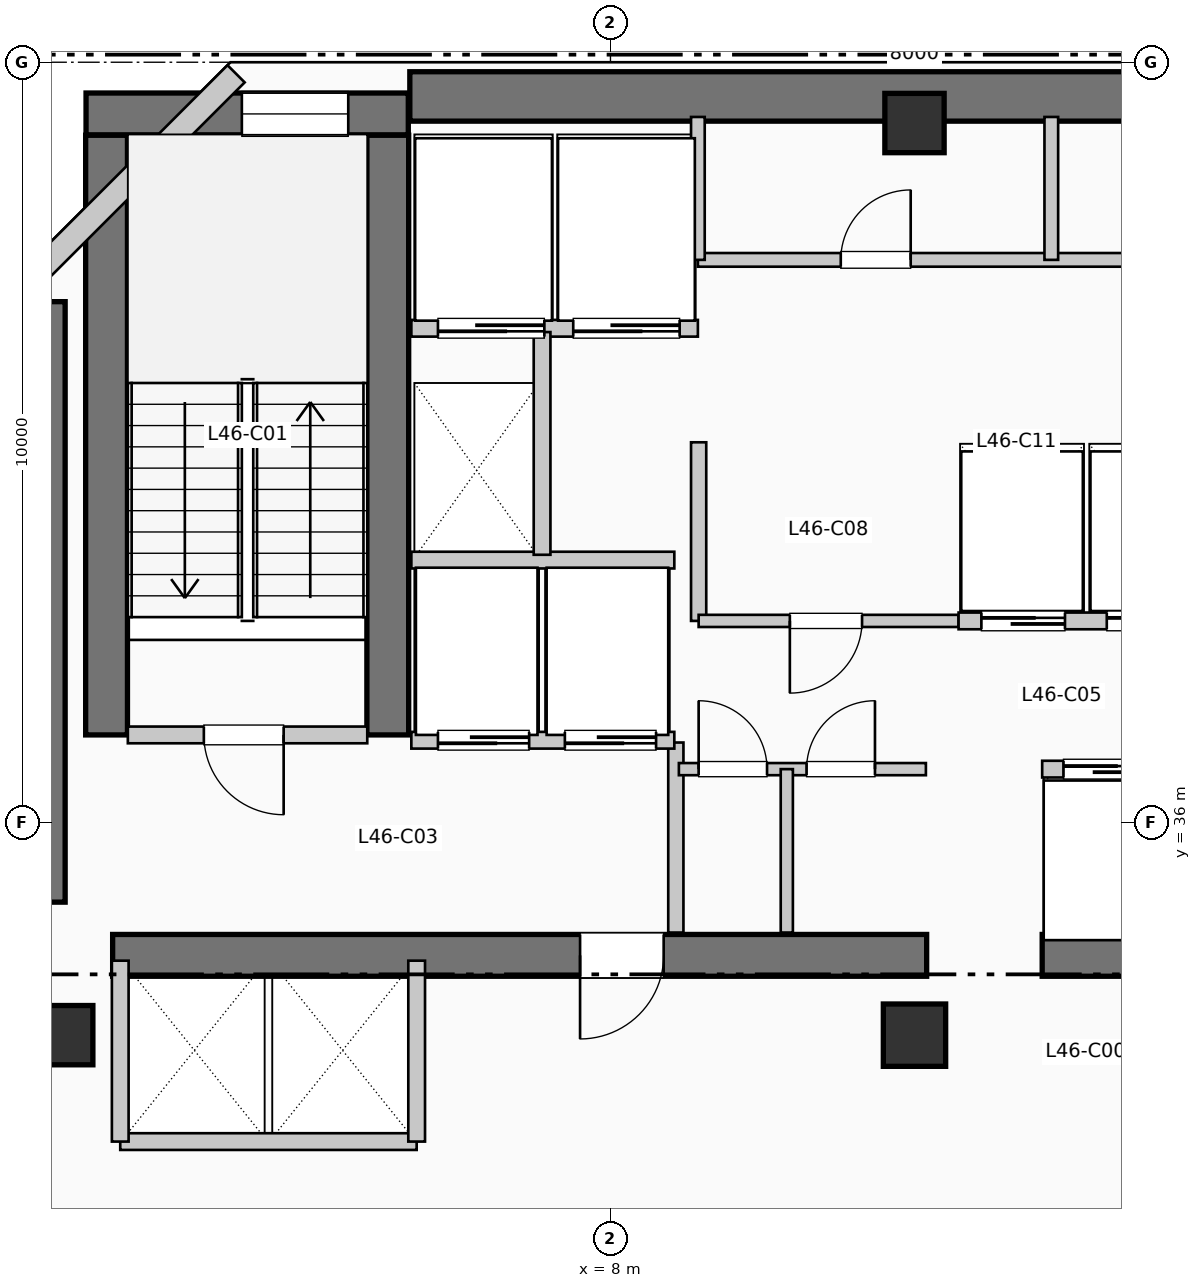
"""IFC4 building model, lengths in metres.
Left out: names, types, materials, properties, quantities, classifications, styles, units other than length and angle.
Written with IfcOpenShell. Run it as: python <this file> out.ifc"""

import sys

from ifc_helpers import new_model, si_unit, direction, frame, frame_2d, origin, origin_2d, place, context, subcontext, project, spatial, rectangle, extrude, element, fill, save


model = new_model("IFC4")
c1 = context("Model", 3, precision=1e-05, world=origin(), true_north=direction((0.0, 1.0)))
c2 = subcontext(c1, "Body", "Model", "MODEL_VIEW")
j1 = project(units=[si_unit("LENGTHUNIT", "METRE"), si_unit("PLANEANGLEUNIT", "RADIAN")], contexts=[c1])
p1 = place(None, origin())
s1 = spatial("IfcSite", under=j1, at=p1, CompositionType="ELEMENT")
p2 = place(p1, origin())
s2 = spatial("IfcBuilding", under=s1, at=p2, CompositionType="ELEMENT")
p3 = place(p2, frame((0.0, 0.0, 191.4)))
s3 = spatial("IfcBuildingStorey", under=s2, at=p3, CompositionType="ELEMENT", Elevation=191.4)
p4 = place(p3, frame((5.36, 45.55, 0.0), z_axis=(0.0, 0.0, 1.0), x_axis=(1.0, 0.0, 0.0)))
e1 = element("IfcWall", 1, at=p4, inside=s3, PredefinedType="SHEAR", context=c2, shape_type="SweptSolid", body=[
    extrude(rectangle(XDim=13.98, YDim=0.65, at=frame_2d((6.99, 0.0))), origin(), (0.0, 0.0, 1.0), 3.96),
])
p5 = place(p3, frame((0.5, 34.95, 0.0), z_axis=(0.0, 0.0, 1.0), x_axis=(0.0, 1.0, 0.0)))
e2 = element("IfcWall", 2, at=p5, inside=s3, PredefinedType="SHEAR", context=c2, shape_type="SweptSolid", body=[
    extrude(rectangle(XDim=7.9, YDim=0.65, at=frame_2d((3.95, 0.0))), origin(), (0.0, 0.0, 1.0), 3.96),
])
p6 = place(p3, frame((1.45, 34.25, 0.0), z_axis=(0.0, 0.0, 1.0), x_axis=(1.0, 0.0, 0.0)))
e3 = element("IfcWall", 3, at=p6, inside=s3, PredefinedType="SHEAR", context=c2, shape_type="SweptSolid", body=[
    extrude(rectangle(XDim=10.71, YDim=0.55, at=frame_2d((5.355, 0.0))), origin(), (0.0, 0.0, 1.0), 3.96),
])
p7 = place(p6, frame((7.25, 0.0, 0.0), z_axis=(0.0, 0.0, 1.0), x_axis=(-1.0, 0.0, 0.0)))
e4 = element("IfcOpeningElement", 4, at=p7, cuts=e3, PredefinedType="OPENING", context=c2, shape_type="SweptSolid", body=[
    extrude(rectangle(XDim=1.1, YDim=2.15, at=frame_2d((0.55, 1.075))), frame((0.0, 0.285, 0.0), z_axis=(0.0, -1.0, 0.0), x_axis=(1.0, 0.0, 0.0)), (0.0, 0.0, 1.0), 0.57),
])
p8 = place(p3, frame((13.68, 34.25, 0.0), z_axis=(0.0, 0.0, 1.0), x_axis=(1.0, 0.0, 0.0)))
e5 = element("IfcWall", 5, at=p8, inside=s3, PredefinedType="SHEAR", context=c2, shape_type="SweptSolid", body=[
    extrude(rectangle(XDim=6.12, YDim=0.55, at=frame_2d((3.06, 0.0))), origin(), (0.0, 0.0, 1.0), 3.96),
])
for number, where, z_axis, x_axis in (
    (6, (1.37, 37.15, 0.0), (0.0, 0.0, 1.0), (0.0, 1.0, 0.0)),
    (7, (5.07, 37.15, 0.0), (0.0, 0.0, 1.0), (0.0, 1.0, 0.0)),
):
    element("IfcWall", number, at=place(p3, frame(where, z_axis=z_axis, x_axis=x_axis)), inside=s3, PredefinedType="SHEAR", context=c2, shape_type="SweptSolid", body=[
        extrude(rectangle(XDim=7.89, YDim=0.55, at=frame_2d((3.945, 0.0))), origin(), (0.0, 0.0, 1.0), 3.96),
    ])
p9 = place(p3, frame((1.1, 45.32, 0.0), z_axis=(0.0, 0.0, 1.0), x_axis=(1.0, 0.0, 0.0)))
e8 = element("IfcWall", 8, at=p9, inside=s3, PredefinedType="SHEAR", context=c2, shape_type="SweptSolid", body=[
    extrude(rectangle(XDim=4.24, YDim=0.55, at=frame_2d((2.12, 0.0))), origin(), (0.0, 0.0, 1.0), 3.96),
])
p10 = place(p9, frame((2.05, 0.0, 1.05)))
e9 = element("IfcOpeningElement", 9, at=p10, cuts=e8, PredefinedType="OPENING", context=c2, shape_type="SweptSolid", body=[
    extrude(rectangle(XDim=1.4, YDim=1.8, at=frame_2d((0.7, 0.9))), frame((0.0, 0.285, 0.0), z_axis=(0.0, -1.0, 0.0), x_axis=(1.0, 0.0, 0.0)), (0.0, 0.0, 1.0), 0.57),
])
p11 = place(p3, frame((0.8, 33.2, 0.0), z_axis=(0.0, 0.0, 1.0), x_axis=(1.0, 0.0, 0.0)))
e10 = element("IfcColumn", 10, at=p11, inside=s3, PredefinedType="COLUMN", context=c2, shape_type="SweptSolid", body=[
    extrude(rectangle(XDim=0.78, YDim=0.78, at=origin_2d()), origin(), (0.0, 0.0, 1.0), 3.96),
])
p12 = place(p3, frame((12.0, 33.2, 0.0), z_axis=(0.0, 0.0, 1.0), x_axis=(1.0, 0.0, 0.0)))
e11 = element("IfcColumn", 11, at=p12, inside=s3, PredefinedType="COLUMN", context=c2, shape_type="SweptSolid", body=[
    extrude(rectangle(XDim=0.82, YDim=0.82, at=origin_2d()), origin(), (0.0, 0.0, 1.0), 3.96),
])
p13 = place(p3, frame((12.0, 45.2, 0.0), z_axis=(0.0, 0.0, 1.0), x_axis=(1.0, 0.0, 0.0)))
e12 = element("IfcColumn", 12, at=p13, inside=s3, PredefinedType="COLUMN", context=c2, shape_type="SweptSolid", body=[
    extrude(rectangle(XDim=0.78, YDim=0.78, at=origin_2d()), origin(), (0.0, 0.0, 1.0), 3.96),
])
p14 = place(p3, frame((3.074, 45.848, 0.0), z_axis=(0.0, 0.0, 1.0), x_axis=(-0.707106781187, -0.707106781187, 0.0)))
e13 = element("IfcWall", 13, at=p14, inside=s3, PredefinedType="SOLIDWALL", context=c2, shape_type="SweptSolid", body=[
    extrude(rectangle(XDim=4.133, YDim=0.32, at=frame_2d((2.066, 0.0))), origin(), (0.0, 0.0, 1.0), 3.71),
])
p15 = place(p3, frame((1.65, 37.15, 0.0), z_axis=(0.0, 0.0, 1.0), x_axis=(1.0, 0.0, 0.0)))
e14 = element("IfcWall", 14, at=p15, inside=s3, PredefinedType="PARTITIONING", context=c2, shape_type="SweptSolid", body=[
    extrude(rectangle(XDim=3.15, YDim=0.22, at=frame_2d((1.575, 0.0))), origin(), (0.0, 0.0, 1.0), 3.71),
])
p16 = place(p15, frame((2.05, 0.0, 0.0), z_axis=(0.0, 0.0, 1.0), x_axis=(-1.0, 0.0, 0.0)))
e15 = element("IfcOpeningElement", 15, at=p16, cuts=e14, PredefinedType="OPENING", context=c2, shape_type="SweptSolid", body=[
    extrude(rectangle(XDim=1.05, YDim=2.15, at=frame_2d((0.525, 1.075))), frame((0.0, 0.12, 0.0), z_axis=(0.0, -1.0, 0.0), x_axis=(1.0, 0.0, 0.0)), (0.0, 0.0, 1.0), 0.24),
])
p17 = place(p3, frame((8.86, 34.55, 0.0), z_axis=(0.0, 0.0, 1.0), x_axis=(0.0, 1.0, 0.0)))
e16 = element("IfcWall", 16, at=p17, inside=s3, PredefinedType="PARTITIONING", context=c2, shape_type="SweptSolid", body=[
    extrude(rectangle(XDim=2.5, YDim=0.2, at=frame_2d((1.25, 0.0))), origin(), (0.0, 0.0, 1.0), 3.71),
])
p18 = place(p3, frame((5.38, 37.08, 0.0), z_axis=(0.0, 0.0, 1.0), x_axis=(1.0, 0.0, 0.0)))
e17 = element("IfcWall", 17, at=p18, inside=s3, PredefinedType="PARTITIONING", context=c2, shape_type="SweptSolid", body=[
    extrude(rectangle(XDim=3.46, YDim=0.22, at=frame_2d((1.73, 0.0))), origin(), (0.0, 0.0, 1.0), 3.71),
])
p19 = place(p18, frame((1.55, 0.0, 0.0), z_axis=(0.0, 0.0, 1.0), x_axis=(-1.0, 0.0, 0.0)))
e18 = element("IfcOpeningElement", 18, at=p19, cuts=e17, PredefinedType="OPENING", context=c2, shape_type="SweptSolid", body=[
    extrude(rectangle(XDim=1.2, YDim=2.2, at=frame_2d((0.6, 1.1))), frame((0.0, 0.12, 0.0), z_axis=(0.0, -1.0, 0.0), x_axis=(1.0, 0.0, 0.0)), (0.0, 0.0, 1.0), 0.24),
])
p20 = place(p18, frame((3.22, 0.0, 0.0), z_axis=(0.0, 0.0, 1.0), x_axis=(-1.0, 0.0, 0.0)))
e19 = element("IfcOpeningElement", 19, at=p20, cuts=e17, PredefinedType="OPENING", context=c2, shape_type="SweptSolid", body=[
    extrude(rectangle(XDim=1.2, YDim=2.2, at=frame_2d((0.6, 1.1))), frame((0.0, 0.12, 0.0), z_axis=(0.0, -1.0, 0.0), x_axis=(1.0, 0.0, 0.0)), (0.0, 0.0, 1.0), 0.24),
])
p21 = place(p3, frame((5.38, 39.45, 0.0), z_axis=(0.0, 0.0, 1.0), x_axis=(1.0, 0.0, 0.0)))
e20 = element("IfcWall", 20, at=p21, inside=s3, PredefinedType="PARTITIONING", context=c2, shape_type="SweptSolid", body=[
    extrude(rectangle(XDim=3.46, YDim=0.22, at=frame_2d((1.73, 0.0))), origin(), (0.0, 0.0, 1.0), 3.71),
])
p22 = place(p3, frame((5.38, 42.5, 0.0), z_axis=(0.0, 0.0, 1.0), x_axis=(1.0, 0.0, 0.0)))
e21 = element("IfcWall", 21, at=p22, inside=s3, PredefinedType="PARTITIONING", context=c2, shape_type="SweptSolid", body=[
    extrude(rectangle(XDim=3.77, YDim=0.22, at=frame_2d((1.885, 0.0))), origin(), (0.0, 0.0, 1.0), 3.71),
])
p23 = place(p22, frame((1.75, 0.0, 0.0), z_axis=(0.0, 0.0, 1.0), x_axis=(-1.0, 0.0, 0.0)))
e22 = element("IfcOpeningElement", 22, at=p23, cuts=e21, PredefinedType="OPENING", context=c2, shape_type="SweptSolid", body=[
    extrude(rectangle(XDim=1.4, YDim=2.2, at=frame_2d((0.7, 1.1))), frame((0.0, 0.12, 0.0), z_axis=(0.0, -1.0, 0.0), x_axis=(1.0, 0.0, 0.0)), (0.0, 0.0, 1.0), 0.24),
])
p24 = place(p22, frame((3.53, 0.0, 0.0), z_axis=(0.0, 0.0, 1.0), x_axis=(-1.0, 0.0, 0.0)))
e23 = element("IfcOpeningElement", 23, at=p24, cuts=e21, PredefinedType="OPENING", context=c2, shape_type="SweptSolid", body=[
    extrude(rectangle(XDim=1.4, YDim=2.2, at=frame_2d((0.7, 1.1))), frame((0.0, 0.12, 0.0), z_axis=(0.0, -1.0, 0.0), x_axis=(1.0, 0.0, 0.0)), (0.0, 0.0, 1.0), 0.24),
])
p25 = place(p3, frame((7.1, 39.52, 0.0), z_axis=(0.0, 0.0, 1.0), x_axis=(0.0, 1.0, 0.0)))
e24 = element("IfcWall", 24, at=p25, inside=s3, PredefinedType="PARTITIONING", context=c2, shape_type="SweptSolid", body=[
    extrude(rectangle(XDim=2.93, YDim=0.22, at=frame_2d((1.465, 0.0))), origin(), (0.0, 0.0, 1.0), 3.71),
])
p26 = place(p3, frame((1.55, 31.8, 0.0), z_axis=(0.0, 0.0, 1.0), x_axis=(1.0, 0.0, 0.0)))
e25 = element("IfcWall", 25, at=p26, inside=s3, PredefinedType="PARTITIONING", context=c2, shape_type="SweptSolid", body=[
    extrude(rectangle(XDim=3.9, YDim=0.22, at=frame_2d((1.95, 0.0))), origin(), (0.0, 0.0, 1.0), 3.71),
])
for number, where, z_axis, x_axis in (
    (26, (1.55, 31.8, 0.0), (0.0, 0.0, 1.0), (0.0, 1.0, 0.0)),
    (27, (5.45, 31.8, 0.0), (0.0, 0.0, 1.0), (0.0, 1.0, 0.0)),
):
    element("IfcWall", number, at=place(p3, frame(where, z_axis=z_axis, x_axis=x_axis)), inside=s3, PredefinedType="PARTITIONING", context=c2, shape_type="SweptSolid", body=[
        extrude(rectangle(XDim=2.38, YDim=0.22, at=frame_2d((1.19, 0.0))), origin(), (0.0, 0.0, 1.0), 3.71),
    ])
p27 = place(p3, frame((9.16, 38.65, 0.0), z_axis=(0.0, 0.0, 1.0), x_axis=(0.0, 1.0, 0.0)))
e28 = element("IfcWall", 28, at=p27, inside=s3, PredefinedType="PARTITIONING", context=c2, shape_type="SweptSolid", body=[
    extrude(rectangle(XDim=2.35, YDim=0.2, at=frame_2d((1.175, 0.0))), origin(), (0.0, 0.0, 1.0), 3.71),
])
p28 = place(p3, frame((8.9, 36.7, 0.0), z_axis=(0.0, 0.0, 1.0), x_axis=(1.0, 0.0, 0.0)))
e29 = element("IfcWall", 29, at=p28, inside=s3, PredefinedType="PARTITIONING", context=c2, shape_type="SweptSolid", body=[
    extrude(rectangle(XDim=3.25, YDim=0.16, at=frame_2d((1.625, 0.0))), origin(), (0.0, 0.0, 1.0), 3.71),
])
p29 = place(p28, frame((0.26, 0.0, 0.0)))
e30 = element("IfcOpeningElement", 30, at=p29, cuts=e29, PredefinedType="OPENING", context=c2, shape_type="SweptSolid", body=[
    extrude(rectangle(XDim=0.9, YDim=2.15, at=frame_2d((0.45, 1.075))), frame((0.0, 0.09, 0.0), z_axis=(0.0, -1.0, 0.0), x_axis=(1.0, 0.0, 0.0)), (0.0, 0.0, 1.0), 0.18),
])
p30 = place(p28, frame((1.68, 0.0, 0.0)))
e31 = element("IfcOpeningElement", 31, at=p30, cuts=e29, PredefinedType="OPENING", context=c2, shape_type="SweptSolid", body=[
    extrude(rectangle(XDim=0.9, YDim=2.15, at=frame_2d((0.45, 1.075))), frame((0.0, 0.09, 0.0), z_axis=(0.0, -1.0, 0.0), x_axis=(1.0, 0.0, 0.0)), (0.0, 0.0, 1.0), 0.18),
])
p31 = place(p3, frame((10.32, 34.55, 0.0), z_axis=(0.0, 0.0, 1.0), x_axis=(0.0, 1.0, 0.0)))
e32 = element("IfcWall", 32, at=p31, inside=s3, PredefinedType="PARTITIONING", context=c2, shape_type="SweptSolid", body=[
    extrude(rectangle(XDim=2.15, YDim=0.16, at=frame_2d((1.075, 0.0))), origin(), (0.0, 0.0, 1.0), 3.71),
])
p32 = place(p3, frame((9.16, 38.65, 0.0), z_axis=(0.0, 0.0, 1.0), x_axis=(1.0, 0.0, 0.0)))
e33 = element("IfcWall", 33, at=p32, inside=s3, PredefinedType="PARTITIONING", context=c2, shape_type="SweptSolid", body=[
    extrude(rectangle(XDim=3.42, YDim=0.16, at=frame_2d((1.71, 0.0))), origin(), (0.0, 0.0, 1.0), 3.71),
])
p33 = place(p32, frame((2.15, 0.0, 0.0), z_axis=(0.0, 0.0, 1.0), x_axis=(-1.0, 0.0, 0.0)))
e34 = element("IfcOpeningElement", 34, at=p33, cuts=e33, PredefinedType="OPENING", context=c2, shape_type="SweptSolid", body=[
    extrude(rectangle(XDim=0.95, YDim=2.15, at=frame_2d((0.475, 1.075))), frame((0.0, 0.09, 0.0), z_axis=(0.0, -1.0, 0.0), x_axis=(1.0, 0.0, 0.0)), (0.0, 0.0, 1.0), 0.18),
])
p34 = place(p3, frame((13.68, 36.7, 0.0), z_axis=(0.0, 0.0, 1.0), x_axis=(1.0, 0.0, 0.0)))
e35 = element("IfcWall", 35, at=p34, inside=s3, PredefinedType="PARTITIONING", context=c2, shape_type="SweptSolid", body=[
    extrude(rectangle(XDim=3.28, YDim=0.22, at=frame_2d((1.64, 0.0))), origin(), (0.0, 0.0, 1.0), 3.71),
])
p35 = place(p34, frame((0.28, 0.0, 0.0)))
e36 = element("IfcOpeningElement", 36, at=p35, cuts=e35, PredefinedType="OPENING", context=c2, shape_type="SweptSolid", body=[
    extrude(rectangle(XDim=1.1, YDim=2.2, at=frame_2d((0.55, 1.1))), frame((0.0, 0.12, 0.0), z_axis=(0.0, -1.0, 0.0), x_axis=(1.0, 0.0, 0.0)), (0.0, 0.0, 1.0), 0.24),
])
p36 = place(p34, frame((1.9, 0.0, 0.0)))
e37 = element("IfcOpeningElement", 37, at=p36, cuts=e35, PredefinedType="OPENING", context=c2, shape_type="SweptSolid", body=[
    extrude(rectangle(XDim=1.1, YDim=2.2, at=frame_2d((0.55, 1.1))), frame((0.0, 0.12, 0.0), z_axis=(0.0, -1.0, 0.0), x_axis=(1.0, 0.0, 0.0)), (0.0, 0.0, 1.0), 0.24),
])
p37 = place(p3, frame((12.58, 38.65, 0.0), z_axis=(0.0, 0.0, 1.0), x_axis=(1.0, 0.0, 0.0)))
e38 = element("IfcWall", 38, at=p37, inside=s3, PredefinedType="PARTITIONING", context=c2, shape_type="SweptSolid", body=[
    extrude(rectangle(XDim=3.38, YDim=0.22, at=frame_2d((1.69, 0.0))), origin(), (0.0, 0.0, 1.0), 3.71),
])
p38 = place(p37, frame((0.3, 0.0, 0.0)))
e39 = element("IfcOpeningElement", 39, at=p38, cuts=e38, PredefinedType="OPENING", context=c2, shape_type="SweptSolid", body=[
    extrude(rectangle(XDim=1.1, YDim=2.2, at=frame_2d((0.55, 1.1))), frame((0.0, 0.12, 0.0), z_axis=(0.0, -1.0, 0.0), x_axis=(1.0, 0.0, 0.0)), (0.0, 0.0, 1.0), 0.24),
])
p39 = place(p37, frame((1.95, 0.0, 0.0)))
e40 = element("IfcOpeningElement", 40, at=p39, cuts=e38, PredefinedType="OPENING", context=c2, shape_type="SweptSolid", body=[
    extrude(rectangle(XDim=1.1, YDim=2.2, at=frame_2d((0.55, 1.1))), frame((0.0, 0.12, 0.0), z_axis=(0.0, -1.0, 0.0), x_axis=(1.0, 0.0, 0.0)), (0.0, 0.0, 1.0), 0.24),
])
p40 = place(p3, frame((9.15, 43.4, 0.0), z_axis=(0.0, 0.0, 1.0), x_axis=(1.0, 0.0, 0.0)))
e41 = element("IfcWall", 41, at=p40, inside=s3, PredefinedType="PLUMBINGWALL", context=c2, shape_type="SweptSolid", body=[
    extrude(rectangle(XDim=9.33, YDim=0.18, at=frame_2d((4.665, 0.0))), origin(), (0.0, 0.0, 1.0), 3.71),
])
p41 = place(p40, frame((1.88, 0.0, 0.0)))
e42 = element("IfcOpeningElement", 42, at=p41, cuts=e41, PredefinedType="OPENING", context=c2, shape_type="SweptSolid", body=[
    extrude(rectangle(XDim=0.92, YDim=2.1, at=frame_2d((0.46, 1.05))), frame((0.0, 0.1, 0.0), z_axis=(0.0, -1.0, 0.0), x_axis=(1.0, 0.0, 0.0)), (0.0, 0.0, 1.0), 0.2),
])
p42 = place(p40, frame((6.515, 0.0, 0.0)))
e43 = element("IfcOpeningElement", 43, at=p42, cuts=e41, PredefinedType="OPENING", context=c2, shape_type="SweptSolid", body=[
    extrude(rectangle(XDim=0.92, YDim=2.1, at=frame_2d((0.46, 1.05))), frame((0.0, 0.1, 0.0), z_axis=(0.0, -1.0, 0.0), x_axis=(1.0, 0.0, 0.0)), (0.0, 0.0, 1.0), 0.2),
])
for number, where, z_axis, x_axis in (
    (44, (9.15, 43.4, 0.0), (0.0, 0.0, 1.0), (0.0, 1.0, 0.0)),
    (45, (13.8, 43.4, 0.0), (0.0, 0.0, 1.0), (0.0, 1.0, 0.0)),
):
    element("IfcWall", number, at=place(p3, frame(where, z_axis=z_axis, x_axis=x_axis)), inside=s3, PredefinedType="PLUMBINGWALL", context=c2, shape_type="SweptSolid", body=[
        extrude(rectangle(XDim=1.88, YDim=0.18, at=frame_2d((0.94, 0.0))), origin(), (0.0, 0.0, 1.0), 3.71),
    ])
p43 = place(p10, origin())
e46 = element("IfcWindow", 46, at=p43, inside=s3, PartitioningType="SINGLE_PANEL", PredefinedType="WINDOW", context=c2, shape_type="SweptSolid", body=[
    extrude(rectangle(XDim=1.4, YDim=1.8, at=frame_2d((0.7, 0.9))), frame((0.0, 0.03, 0.0), z_axis=(0.0, -1.0, 0.0), x_axis=(1.0, 0.0, 0.0)), (0.0, 0.0, 1.0), 0.06),
])
fill(e9, e46)
p44 = place(p16, origin())
e47 = element("IfcDoor", 47, at=p44, inside=s3, OperationType="SINGLE_SWING_RIGHT", PredefinedType="DOOR", context=c2, shape_type="SweptSolid", body=[
    extrude(rectangle(XDim=1.05, YDim=2.15, at=frame_2d((0.525, 1.075))), frame((0.0, 0.025, 0.0), z_axis=(0.0, -1.0, 0.0), x_axis=(1.0, 0.0, 0.0)), (0.0, 0.0, 1.0), 0.05),
])
fill(e15, e47)
p45 = place(p7, origin())
e48 = element("IfcDoor", 48, at=p45, inside=s3, OperationType="SINGLE_SWING_LEFT", PredefinedType="DOOR", context=c2, shape_type="SweptSolid", body=[
    extrude(rectangle(XDim=1.1, YDim=2.15, at=frame_2d((0.55, 1.075))), frame((0.0, 0.025, 0.0), z_axis=(0.0, -1.0, 0.0), x_axis=(1.0, 0.0, 0.0)), (0.0, 0.0, 1.0), 0.05),
])
fill(e4, e48)
p46 = place(p19, origin())
e49 = element("IfcDoor", 49, at=p46, inside=s3, OperationType="SLIDING_TO_RIGHT", PredefinedType="DOOR", context=c2, shape_type="SweptSolid", body=[
    extrude(rectangle(XDim=1.2, YDim=2.2, at=frame_2d((0.6, 1.1))), frame((0.0, 0.025, 0.0), z_axis=(0.0, -1.0, 0.0), x_axis=(1.0, 0.0, 0.0)), (0.0, 0.0, 1.0), 0.05),
])
fill(e18, e49)
p47 = place(p20, origin())
e50 = element("IfcDoor", 50, at=p47, inside=s3, OperationType="SLIDING_TO_RIGHT", PredefinedType="DOOR", context=c2, shape_type="SweptSolid", body=[
    extrude(rectangle(XDim=1.2, YDim=2.2, at=frame_2d((0.6, 1.1))), frame((0.0, 0.025, 0.0), z_axis=(0.0, -1.0, 0.0), x_axis=(1.0, 0.0, 0.0)), (0.0, 0.0, 1.0), 0.05),
])
fill(e19, e50)
p48 = place(p23, origin())
e51 = element("IfcDoor", 51, at=p48, inside=s3, OperationType="SLIDING_TO_LEFT", PredefinedType="DOOR", context=c2, shape_type="SweptSolid", body=[
    extrude(rectangle(XDim=1.4, YDim=2.2, at=frame_2d((0.7, 1.1))), frame((0.0, 0.025, 0.0), z_axis=(0.0, -1.0, 0.0), x_axis=(1.0, 0.0, 0.0)), (0.0, 0.0, 1.0), 0.05),
])
fill(e22, e51)
p49 = place(p24, origin())
e52 = element("IfcDoor", 52, at=p49, inside=s3, OperationType="SLIDING_TO_LEFT", PredefinedType="DOOR", context=c2, shape_type="SweptSolid", body=[
    extrude(rectangle(XDim=1.4, YDim=2.2, at=frame_2d((0.7, 1.1))), frame((0.0, 0.025, 0.0), z_axis=(0.0, -1.0, 0.0), x_axis=(1.0, 0.0, 0.0)), (0.0, 0.0, 1.0), 0.05),
])
fill(e23, e52)
p50 = place(p29, origin())
e53 = element("IfcDoor", 53, at=p50, inside=s3, OperationType="SINGLE_SWING_LEFT", PredefinedType="DOOR", context=c2, shape_type="SweptSolid", body=[
    extrude(rectangle(XDim=0.9, YDim=2.15, at=frame_2d((0.45, 1.075))), frame((0.0, 0.025, 0.0), z_axis=(0.0, -1.0, 0.0), x_axis=(1.0, 0.0, 0.0)), (0.0, 0.0, 1.0), 0.05),
])
fill(e30, e53)
p51 = place(p30, origin())
e54 = element("IfcDoor", 54, at=p51, inside=s3, OperationType="SINGLE_SWING_RIGHT", PredefinedType="DOOR", context=c2, shape_type="SweptSolid", body=[
    extrude(rectangle(XDim=0.9, YDim=2.15, at=frame_2d((0.45, 1.075))), frame((0.0, 0.025, 0.0), z_axis=(0.0, -1.0, 0.0), x_axis=(1.0, 0.0, 0.0)), (0.0, 0.0, 1.0), 0.05),
])
fill(e31, e54)
p52 = place(p33, origin())
e55 = element("IfcDoor", 55, at=p52, inside=s3, OperationType="SINGLE_SWING_LEFT", PredefinedType="DOOR", context=c2, shape_type="SweptSolid", body=[
    extrude(rectangle(XDim=0.95, YDim=2.15, at=frame_2d((0.475, 1.075))), frame((0.0, 0.025, 0.0), z_axis=(0.0, -1.0, 0.0), x_axis=(1.0, 0.0, 0.0)), (0.0, 0.0, 1.0), 0.05),
])
fill(e34, e55)
p53 = place(p35, origin())
e56 = element("IfcDoor", 56, at=p53, inside=s3, OperationType="SLIDING_TO_RIGHT", PredefinedType="DOOR", context=c2, shape_type="SweptSolid", body=[
    extrude(rectangle(XDim=1.1, YDim=2.2, at=frame_2d((0.55, 1.1))), frame((0.0, 0.025, 0.0), z_axis=(0.0, -1.0, 0.0), x_axis=(1.0, 0.0, 0.0)), (0.0, 0.0, 1.0), 0.05),
])
fill(e36, e56)
p54 = place(p38, origin())
e57 = element("IfcDoor", 57, at=p54, inside=s3, OperationType="SLIDING_TO_RIGHT", PredefinedType="DOOR", context=c2, shape_type="SweptSolid", body=[
    extrude(rectangle(XDim=1.1, YDim=2.2, at=frame_2d((0.55, 1.1))), frame((0.0, 0.025, 0.0), z_axis=(0.0, -1.0, 0.0), x_axis=(1.0, 0.0, 0.0)), (0.0, 0.0, 1.0), 0.05),
])
fill(e39, e57)
p55 = place(p39, origin())
e58 = element("IfcDoor", 58, at=p55, inside=s3, OperationType="SLIDING_TO_RIGHT", PredefinedType="DOOR", context=c2, shape_type="SweptSolid", body=[
    extrude(rectangle(XDim=1.1, YDim=2.2, at=frame_2d((0.55, 1.1))), frame((0.0, 0.025, 0.0), z_axis=(0.0, -1.0, 0.0), x_axis=(1.0, 0.0, 0.0)), (0.0, 0.0, 1.0), 0.05),
])
fill(e40, e58)
p56 = place(p41, origin())
e59 = element("IfcDoor", 59, at=p56, inside=s3, OperationType="SINGLE_SWING_RIGHT", PredefinedType="DOOR", context=c2, shape_type="SweptSolid", body=[
    extrude(rectangle(XDim=0.92, YDim=2.1, at=frame_2d((0.46, 1.05))), frame((0.0, 0.025, 0.0), z_axis=(0.0, -1.0, 0.0), x_axis=(1.0, 0.0, 0.0)), (0.0, 0.0, 1.0), 0.05),
])
fill(e42, e59)
save(model, sys.argv[1])
